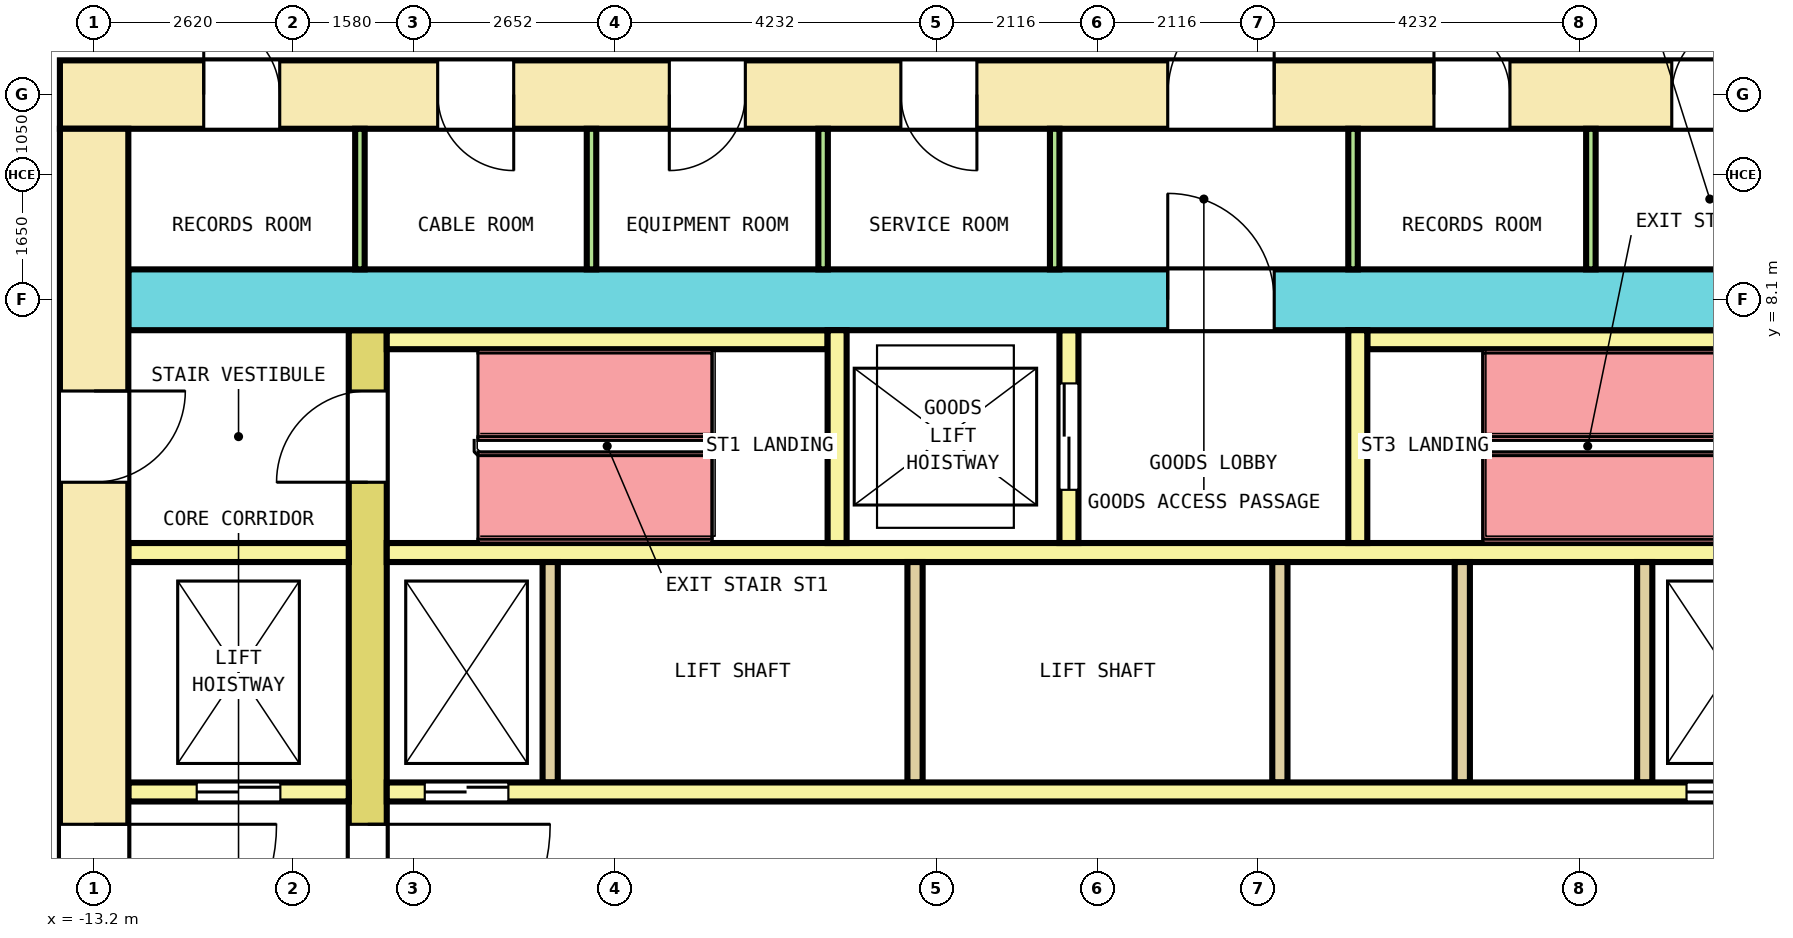
"""IFC4 building model, lengths in metres.
Left out: names, types, materials, properties, quantities, classifications, styles, units other than length and angle.
Written with IfcOpenShell. Run it as: python <this file> out.ifc"""

import sys

from ifc_helpers import new_model, si_unit, direction, frame, frame_2d, origin, place, context, subcontext, project, spatial, rectangle, extrude, element, fill, save


model = new_model("IFC4")
c1 = context("Model", 3, precision=1e-05, world=origin(), true_north=direction((0.0, 1.0)))
c2 = subcontext(c1, "Body", "Model", "MODEL_VIEW")
j1 = project(units=[si_unit("LENGTHUNIT", "METRE"), si_unit("PLANEANGLEUNIT", "RADIAN")], contexts=[c1])
p1 = place(None, origin())
s1 = spatial("IfcSite", under=j1, at=p1, CompositionType="ELEMENT")
p2 = place(p1, origin())
s2 = spatial("IfcBuilding", under=s1, at=p2, CompositionType="ELEMENT")
p3 = place(p2, frame((0.0, 0.0, 23.4)))
s3 = spatial("IfcBuildingStorey", under=s2, at=p3, CompositionType="ELEMENT", Elevation=23.4)
p4 = place(p3, frame((-13.65, 10.8, 0.0), z_axis=(0.0, 0.0, 1.0), x_axis=(1.0, 0.0, 0.0)))
e1 = element("IfcWall", 1, at=p4, inside=s3, PredefinedType="SHEAR", context=c2, shape_type="SweptSolid", body=[
    extrude(rectangle(XDim=27.3, YDim=0.9, at=frame_2d((13.65, 0.0))), origin(), (0.0, 0.0, 1.0), 4.1),
])
p5 = place(p4, frame((1.892, 0.0, 0.0)))
e2 = element("IfcOpeningElement", 2, at=p5, cuts=e1, PredefinedType="OPENING", context=c2, shape_type="SweptSolid", body=[
    extrude(rectangle(XDim=1.0, YDim=2.1, at=frame_2d((0.5, 1.05))), frame((0.0, 0.46, 0.0), z_axis=(0.0, -1.0, 0.0), x_axis=(1.0, 0.0, 0.0)), (0.0, 0.0, 1.0), 0.92),
])
p6 = place(p4, frame((4.97, 0.0, 0.0)))
e3 = element("IfcOpeningElement", 3, at=p6, cuts=e1, PredefinedType="OPENING", context=c2, shape_type="SweptSolid", body=[
    extrude(rectangle(XDim=1.0, YDim=2.1, at=frame_2d((0.5, 1.05))), frame((0.0, 0.46, 0.0), z_axis=(0.0, -1.0, 0.0), x_axis=(1.0, 0.0, 0.0)), (0.0, 0.0, 1.0), 0.92),
])
p7 = place(p4, frame((8.017, 0.0, 0.0)))
e4 = element("IfcOpeningElement", 4, at=p7, cuts=e1, PredefinedType="OPENING", context=c2, shape_type="SweptSolid", body=[
    extrude(rectangle(XDim=1.0, YDim=2.1, at=frame_2d((0.5, 1.05))), frame((0.0, 0.46, 0.0), z_axis=(0.0, -1.0, 0.0), x_axis=(1.0, 0.0, 0.0)), (0.0, 0.0, 1.0), 0.92),
])
p8 = place(p4, frame((11.064, 0.0, 0.0)))
e5 = element("IfcOpeningElement", 5, at=p8, cuts=e1, PredefinedType="OPENING", context=c2, shape_type="SweptSolid", body=[
    extrude(rectangle(XDim=1.0, YDim=2.1, at=frame_2d((0.5, 1.05))), frame((0.0, 0.46, 0.0), z_axis=(0.0, -1.0, 0.0), x_axis=(1.0, 0.0, 0.0)), (0.0, 0.0, 1.0), 0.92),
])
p9 = place(p4, frame((18.077, 0.0, 0.0)))
e6 = element("IfcOpeningElement", 6, at=p9, cuts=e1, PredefinedType="OPENING", context=c2, shape_type="SweptSolid", body=[
    extrude(rectangle(XDim=1.0, YDim=2.1, at=frame_2d((0.5, 1.05))), frame((0.0, 0.46, 0.0), z_axis=(0.0, -1.0, 0.0), x_axis=(1.0, 0.0, 0.0)), (0.0, 0.0, 1.0), 0.92),
])
p10 = place(p4, frame((21.206, 0.0, 0.0)))
e7 = element("IfcOpeningElement", 7, at=p10, cuts=e1, PredefinedType="OPENING", context=c2, shape_type="SweptSolid", body=[
    extrude(rectangle(XDim=1.0, YDim=2.1, at=frame_2d((0.5, 1.05))), frame((0.0, 0.46, 0.0), z_axis=(0.0, -1.0, 0.0), x_axis=(1.0, 0.0, 0.0)), (0.0, 0.0, 1.0), 0.92),
])
p11 = place(p4, frame((24.367, 0.0, 0.0)))
e8 = element("IfcOpeningElement", 8, at=p11, cuts=e1, PredefinedType="OPENING", context=c2, shape_type="SweptSolid", body=[
    extrude(rectangle(XDim=1.0, YDim=2.1, at=frame_2d((0.5, 1.05))), frame((0.0, 0.46, 0.0), z_axis=(0.0, -1.0, 0.0), x_axis=(1.0, 0.0, 0.0)), (0.0, 0.0, 1.0), 0.92),
])
p12 = place(p4, frame((14.575, 0.0, 0.0)))
e9 = element("IfcOpeningElement", 9, at=p12, cuts=e1, PredefinedType="OPENING", context=c2, shape_type="SweptSolid", body=[
    extrude(rectangle(XDim=1.4, YDim=2.1, at=frame_2d((0.7, 1.05))), frame((0.0, 0.46, 0.0), z_axis=(0.0, -1.0, 0.0), x_axis=(1.0, 0.0, 0.0)), (0.0, 0.0, 1.0), 0.92),
])
p13 = place(p3, frame((-13.2, -10.35, 0.0), z_axis=(0.0, 0.0, 1.0), x_axis=(0.0, 1.0, 0.0)))
e10 = element("IfcWall", 10, at=p13, inside=s3, PredefinedType="SHEAR", context=c2, shape_type="SweptSolid", body=[
    extrude(rectangle(XDim=20.7, YDim=0.9, at=frame_2d((10.35, 0.0))), origin(), (0.0, 0.0, 1.0), 4.1),
])
p14 = place(p13, frame((9.15, 0.0, 0.0)))
e11 = element("IfcOpeningElement", 11, at=p14, cuts=e10, PredefinedType="OPENING", context=c2, shape_type="SweptSolid", body=[
    extrude(rectangle(XDim=2.4, YDim=2.1, at=frame_2d((1.2, 1.05))), frame((0.0, 0.46, 0.0), z_axis=(0.0, -1.0, 0.0), x_axis=(1.0, 0.0, 0.0)), (0.0, 0.0, 1.0), 0.92),
])
p15 = place(p13, frame((16.05, 0.0, 0.0)))
e12 = element("IfcOpeningElement", 12, at=p15, cuts=e10, PredefinedType="OPENING", context=c2, shape_type="SweptSolid", body=[
    extrude(rectangle(XDim=1.2, YDim=2.1, at=frame_2d((0.6, 1.05))), frame((0.0, 0.46, 0.0), z_axis=(0.0, -1.0, 0.0), x_axis=(1.0, 0.0, 0.0)), (0.0, 0.0, 1.0), 0.92),
])
p16 = place(p13, frame((3.45, 0.0, 0.0)))
e13 = element("IfcOpeningElement", 13, at=p16, cuts=e10, PredefinedType="OPENING", context=c2, shape_type="SweptSolid", body=[
    extrude(rectangle(XDim=1.2, YDim=2.1, at=frame_2d((0.6, 1.05))), frame((0.0, 0.46, 0.0), z_axis=(0.0, -1.0, 0.0), x_axis=(1.0, 0.0, 0.0)), (0.0, 0.0, 1.0), 0.92),
])
p17 = place(p3, frame((-12.75, 8.1, 0.0), z_axis=(0.0, 0.0, 1.0), x_axis=(1.0, 0.0, 0.0)))
e14 = element("IfcWall", 14, at=p17, inside=s3, PredefinedType="SHEAR", context=c2, shape_type="SweptSolid", body=[
    extrude(rectangle(XDim=25.5, YDim=0.8, at=frame_2d((12.75, 0.0))), origin(), (0.0, 0.0, 1.0), 4.1),
])
p18 = place(p17, frame((13.675, 0.0, 0.0)))
e15 = element("IfcOpeningElement", 15, at=p18, cuts=e14, PredefinedType="OPENING", context=c2, shape_type="SweptSolid", body=[
    extrude(rectangle(XDim=1.4, YDim=2.1, at=frame_2d((0.7, 1.05))), frame((0.0, 0.41, 0.0), z_axis=(0.0, -1.0, 0.0), x_axis=(1.0, 0.0, 0.0)), (0.0, 0.0, 1.0), 0.82),
])
p19 = place(p3, frame((-9.6, -7.7, 0.0), z_axis=(0.0, 0.0, 1.0), x_axis=(0.0, 1.0, 0.0)))
e16 = element("IfcWall", 16, at=p19, inside=s3, PredefinedType="SHEAR", context=c2, shape_type="SweptSolid", body=[
    extrude(rectangle(XDim=15.4, YDim=0.5, at=frame_2d((7.7, 0.0))), origin(), (0.0, 0.0, 1.0), 4.1),
])
p20 = place(p19, frame((6.5, 0.0, 0.0)))
e17 = element("IfcOpeningElement", 17, at=p20, cuts=e16, PredefinedType="OPENING", context=c2, shape_type="SweptSolid", body=[
    extrude(rectangle(XDim=2.4, YDim=2.1, at=frame_2d((1.2, 1.05))), frame((0.0, 0.26, 0.0), z_axis=(0.0, -1.0, 0.0), x_axis=(1.0, 0.0, 0.0)), (0.0, 0.0, 1.0), 0.52),
])
p21 = place(p19, frame((13.4, 0.0, 0.0)))
e18 = element("IfcOpeningElement", 18, at=p21, cuts=e16, PredefinedType="OPENING", context=c2, shape_type="SweptSolid", body=[
    extrude(rectangle(XDim=1.2, YDim=2.1, at=frame_2d((0.6, 1.05))), frame((0.0, 0.26, 0.0), z_axis=(0.0, -1.0, 0.0), x_axis=(1.0, 0.0, 0.0)), (0.0, 0.0, 1.0), 0.52),
])
p22 = place(p19, frame((0.8, 0.0, 0.0)))
e19 = element("IfcOpeningElement", 19, at=p22, cuts=e16, PredefinedType="OPENING", context=c2, shape_type="SweptSolid", body=[
    extrude(rectangle(XDim=1.2, YDim=2.1, at=frame_2d((0.6, 1.05))), frame((0.0, 0.26, 0.0), z_axis=(0.0, -1.0, 0.0), x_axis=(1.0, 0.0, 0.0)), (0.0, 0.0, 1.0), 0.52),
])
p23 = place(p3, frame((-12.75, 1.625, 0.0), z_axis=(0.0, 0.0, 1.0), x_axis=(1.0, 0.0, 0.0)))
e20 = element("IfcWall", 20, at=p23, inside=s3, PredefinedType="SOLIDWALL", context=c2, shape_type="SweptSolid", body=[
    extrude(rectangle(XDim=2.9, YDim=0.25, at=frame_2d((1.45, 0.0))), origin(), (0.0, 0.0, 1.0), 4.1),
])
p24 = place(p23, frame((0.9, 0.0, 0.0)))
e21 = element("IfcOpeningElement", 21, at=p24, cuts=e20, PredefinedType="OPENING", context=c2, shape_type="SweptSolid", body=[
    extrude(rectangle(XDim=1.1, YDim=2.1, at=frame_2d((0.55, 1.05))), frame((0.0, 0.135, 0.0), z_axis=(0.0, -1.0, 0.0), x_axis=(1.0, 0.0, 0.0)), (0.0, 0.0, 1.0), 0.27),
])
p25 = place(p3, frame((-9.35, 1.625, 0.0), z_axis=(0.0, 0.0, 1.0), x_axis=(1.0, 0.0, 0.0)))
e22 = element("IfcWall", 22, at=p25, inside=s3, PredefinedType="SOLIDWALL", context=c2, shape_type="SweptSolid", body=[
    extrude(rectangle(XDim=18.7, YDim=0.25, at=frame_2d((9.35, 0.0))), origin(), (0.0, 0.0, 1.0), 4.1),
])
p26 = place(p25, frame((0.5, 0.0, 0.0)))
e23 = element("IfcOpeningElement", 23, at=p26, cuts=e22, PredefinedType="OPENING", context=c2, shape_type="SweptSolid", body=[
    extrude(rectangle(XDim=1.1, YDim=2.1, at=frame_2d((0.55, 1.05))), frame((0.0, 0.135, 0.0), z_axis=(0.0, -1.0, 0.0), x_axis=(1.0, 0.0, 0.0)), (0.0, 0.0, 1.0), 0.27),
])
p27 = place(p25, frame((17.1, 0.0, 0.0)))
e24 = element("IfcOpeningElement", 24, at=p27, cuts=e22, PredefinedType="OPENING", context=c2, shape_type="SweptSolid", body=[
    extrude(rectangle(XDim=1.1, YDim=2.1, at=frame_2d((0.55, 1.05))), frame((0.0, 0.135, 0.0), z_axis=(0.0, -1.0, 0.0), x_axis=(1.0, 0.0, 0.0)), (0.0, 0.0, 1.0), 0.27),
])
p28 = place(p3, frame((-12.75, 4.775, 0.0), z_axis=(0.0, 0.0, 1.0), x_axis=(1.0, 0.0, 0.0)))
e25 = element("IfcWall", 25, at=p28, inside=s3, PredefinedType="SOLIDWALL", context=c2, shape_type="SweptSolid", body=[
    extrude(rectangle(XDim=2.9, YDim=0.25, at=frame_2d((1.45, 0.0))), origin(), (0.0, 0.0, 1.0), 4.1),
])
p29 = place(p3, frame((-9.35, 4.775, 0.0), z_axis=(0.0, 0.0, 1.0), x_axis=(1.0, 0.0, 0.0)))
e26 = element("IfcWall", 26, at=p29, inside=s3, PredefinedType="SOLIDWALL", context=c2, shape_type="SweptSolid", body=[
    extrude(rectangle(XDim=18.7, YDim=0.25, at=frame_2d((9.35, 0.0))), origin(), (0.0, 0.0, 1.0), 4.1),
])
for number, where, z_axis, x_axis in (
    (27, (-7.2, 1.75, 0.0), (0.0, 0.0, 1.0), (0.0, 1.0, 0.0)),
    (28, (-2.4, 1.75, 0.0), (0.0, 0.0, 1.0), (0.0, 1.0, 0.0)),
    (29, (2.4, 1.75, 0.0), (0.0, 0.0, 1.0), (0.0, 1.0, 0.0)),
    (30, (4.8, 1.75, 0.0), (0.0, 0.0, 1.0), (0.0, 1.0, 0.0)),
    (31, (7.2, 1.75, 0.0), (0.0, 0.0, 1.0), (0.0, 1.0, 0.0)),
):
    element("IfcWall", number, at=place(p3, frame(where, z_axis=z_axis, x_axis=x_axis)), inside=s3, PredefinedType="SOLIDWALL", context=c2, shape_type="SweptSolid", body=[
        extrude(rectangle(XDim=2.9, YDim=0.2, at=frame_2d((1.45, 0.0))), origin(), (0.0, 0.0, 1.0), 4.1),
    ])
for number, where, z_axis, x_axis in (
    (32, (-9.35, 7.575, 0.0), (0.0, 0.0, 1.0), (1.0, 0.0, 0.0)),
    (33, (3.55, 7.575, 0.0), (0.0, 0.0, 1.0), (1.0, 0.0, 0.0)),
):
    element("IfcWall", number, at=place(p3, frame(where, z_axis=z_axis, x_axis=x_axis)), inside=s3, PredefinedType="SOLIDWALL", context=c2, shape_type="SweptSolid", body=[
        extrude(rectangle(XDim=5.8, YDim=0.25, at=frame_2d((2.9, 0.0))), origin(), (0.0, 0.0, 1.0), 4.1),
    ])
p30 = place(p3, frame((-3.425, 4.9, 0.0), z_axis=(0.0, 0.0, 1.0), x_axis=(0.0, 1.0, 0.0)))
e34 = element("IfcWall", 34, at=p30, inside=s3, PredefinedType="SOLIDWALL", context=c2, shape_type="SweptSolid", body=[
    extrude(rectangle(XDim=2.8, YDim=0.25, at=frame_2d((1.4, 0.0))), origin(), (0.0, 0.0, 1.0), 4.1),
])
p31 = place(p3, frame((-0.375, 4.9, 0.0), z_axis=(0.0, 0.0, 1.0), x_axis=(0.0, 1.0, 0.0)))
e35 = element("IfcWall", 35, at=p31, inside=s3, PredefinedType="SOLIDWALL", context=c2, shape_type="SweptSolid", body=[
    extrude(rectangle(XDim=2.8, YDim=0.25, at=frame_2d((1.4, 0.0))), origin(), (0.0, 0.0, 1.0), 4.1),
])
p32 = place(p31, frame((0.7, 0.0, 0.0)))
e36 = element("IfcOpeningElement", 36, at=p32, cuts=e35, PredefinedType="OPENING", context=c2, shape_type="SweptSolid", body=[
    extrude(rectangle(XDim=1.4, YDim=2.1, at=frame_2d((0.7, 1.05))), frame((0.0, 0.135, 0.0), z_axis=(0.0, -1.0, 0.0), x_axis=(1.0, 0.0, 0.0)), (0.0, 0.0, 1.0), 0.27),
])
p33 = place(p3, frame((3.425, 4.9, 0.0), z_axis=(0.0, 0.0, 1.0), x_axis=(0.0, 1.0, 0.0)))
e37 = element("IfcWall", 37, at=p33, inside=s3, PredefinedType="SOLIDWALL", context=c2, shape_type="SweptSolid", body=[
    extrude(rectangle(XDim=2.8, YDim=0.25, at=frame_2d((1.4, 0.0))), origin(), (0.0, 0.0, 1.0), 4.1),
])
for number, where, z_axis, x_axis in (
    (38, (-9.703, 8.5, 0.0), (0.0, 0.0, 1.0), (0.0, 1.0, 0.0)),
    (39, (-6.656, 8.5, 0.0), (0.0, 0.0, 1.0), (0.0, 1.0, 0.0)),
    (40, (-3.609, 8.5, 0.0), (0.0, 0.0, 1.0), (0.0, 1.0, 0.0)),
    (41, (-0.562, 8.5, 0.0), (0.0, 0.0, 1.0), (0.0, 1.0, 0.0)),
    (42, (3.363, 8.5, 0.0), (0.0, 0.0, 1.0), (0.0, 1.0, 0.0)),
    (43, (6.492, 8.5, 0.0), (0.0, 0.0, 1.0), (0.0, 1.0, 0.0)),
):
    element("IfcWall", number, at=place(p3, frame(where, z_axis=z_axis, x_axis=x_axis)), inside=s3, PredefinedType="PARTITIONING", context=c2, shape_type="SweptSolid", body=[
        extrude(rectangle(XDim=1.85, YDim=0.125, at=frame_2d((0.925, 0.0))), origin(), (0.0, 0.0, 1.0), 4.1),
    ])
p34 = place(p24, origin())
e44 = element("IfcDoor", 44, at=p34, inside=s3, OperationType="DOUBLE_DOOR_SLIDING", PredefinedType="DOOR", context=c2, shape_type="SweptSolid", body=[
    extrude(rectangle(XDim=1.1, YDim=2.1, at=frame_2d((0.55, 1.05))), frame((0.0, 0.075, 0.0), z_axis=(0.0, -1.0, 0.0), x_axis=(1.0, 0.0, 0.0)), (0.0, 0.0, 1.0), 0.15),
])
fill(e21, e44)
p35 = place(p26, origin())
e45 = element("IfcDoor", 45, at=p35, inside=s3, OperationType="DOUBLE_DOOR_SLIDING", PredefinedType="DOOR", context=c2, shape_type="SweptSolid", body=[
    extrude(rectangle(XDim=1.1, YDim=2.1, at=frame_2d((0.55, 1.05))), frame((0.0, 0.075, 0.0), z_axis=(0.0, -1.0, 0.0), x_axis=(1.0, 0.0, 0.0)), (0.0, 0.0, 1.0), 0.15),
])
fill(e23, e45)
p36 = place(p27, origin())
e46 = element("IfcDoor", 46, at=p36, inside=s3, OperationType="DOUBLE_DOOR_SLIDING", PredefinedType="DOOR", context=c2, shape_type="SweptSolid", body=[
    extrude(rectangle(XDim=1.1, YDim=2.1, at=frame_2d((0.55, 1.05))), frame((0.0, 0.075, 0.0), z_axis=(0.0, -1.0, 0.0), x_axis=(1.0, 0.0, 0.0)), (0.0, 0.0, 1.0), 0.15),
])
fill(e24, e46)
p37 = place(p32, origin())
e47 = element("IfcDoor", 47, at=p37, inside=s3, OperationType="DOUBLE_DOOR_SLIDING", PredefinedType="DOOR", context=c2, shape_type="SweptSolid", body=[
    extrude(rectangle(XDim=1.4, YDim=2.1, at=frame_2d((0.7, 1.05))), frame((0.0, 0.075, 0.0), z_axis=(0.0, -1.0, 0.0), x_axis=(1.0, 0.0, 0.0)), (0.0, 0.0, 1.0), 0.15),
])
fill(e36, e47)
p38 = place(p20, origin())
e48 = element("IfcDoor", 48, at=p38, inside=s3, OperationType="DOUBLE_DOOR_SINGLE_SWING", PredefinedType="DOOR", context=c2, shape_type="SweptSolid", body=[
    extrude(rectangle(XDim=2.4, YDim=2.1, at=frame_2d((1.2, 1.05))), frame((0.0, 0.2, 0.0), z_axis=(0.0, -1.0, 0.0), x_axis=(1.0, 0.0, 0.0)), (0.0, 0.0, 1.0), 0.4),
])
fill(e17, e48)
p39 = place(p14, origin())
e49 = element("IfcDoor", 49, at=p39, inside=s3, OperationType="DOUBLE_DOOR_SINGLE_SWING", PredefinedType="DOOR", context=c2, shape_type="SweptSolid", body=[
    extrude(rectangle(XDim=2.4, YDim=2.1, at=frame_2d((1.2, 1.05))), frame((0.0, 0.3, 0.0), z_axis=(0.0, -1.0, 0.0), x_axis=(1.0, 0.0, 0.0)), (0.0, 0.0, 1.0), 0.6),
])
fill(e11, e49)
p40 = place(p21, origin())
e50 = element("IfcDoor", 50, at=p40, inside=s3, OperationType="SINGLE_SWING_LEFT", PredefinedType="DOOR", context=c2, shape_type="SweptSolid", body=[
    extrude(rectangle(XDim=1.2, YDim=2.1, at=frame_2d((0.6, 1.05))), frame((0.0, 0.2, 0.0), z_axis=(0.0, -1.0, 0.0), x_axis=(1.0, 0.0, 0.0)), (0.0, 0.0, 1.0), 0.4),
])
fill(e18, e50)
p41 = place(p15, origin())
e51 = element("IfcDoor", 51, at=p41, inside=s3, OperationType="SINGLE_SWING_RIGHT", PredefinedType="DOOR", context=c2, shape_type="SweptSolid", body=[
    extrude(rectangle(XDim=1.2, YDim=2.1, at=frame_2d((0.6, 1.05))), frame((0.0, 0.3, 0.0), z_axis=(0.0, -1.0, 0.0), x_axis=(1.0, 0.0, 0.0)), (0.0, 0.0, 1.0), 0.6),
])
fill(e12, e51)
p42 = place(p18, origin())
e52 = element("IfcDoor", 52, at=p42, inside=s3, OperationType="DOUBLE_DOOR_SINGLE_SWING", PredefinedType="DOOR", context=c2, shape_type="SweptSolid", body=[
    extrude(rectangle(XDim=1.4, YDim=2.1, at=frame_2d((0.7, 1.05))), frame((0.0, 0.3, 0.0), z_axis=(0.0, -1.0, 0.0), x_axis=(1.0, 0.0, 0.0)), (0.0, 0.0, 1.0), 0.6),
])
fill(e15, e52)
p43 = place(p5, origin())
e53 = element("IfcDoor", 53, at=p43, inside=s3, OperationType="SINGLE_SWING_LEFT", PredefinedType="DOOR", context=c2, shape_type="SweptSolid", body=[
    extrude(rectangle(XDim=1.0, YDim=2.1, at=frame_2d((0.5, 1.05))), frame((0.0, 0.3, 0.0), z_axis=(0.0, -1.0, 0.0), x_axis=(1.0, 0.0, 0.0)), (0.0, 0.0, 1.0), 0.6),
])
fill(e2, e53)
p44 = place(p6, origin())
e54 = element("IfcDoor", 54, at=p44, inside=s3, OperationType="SINGLE_SWING_RIGHT", PredefinedType="DOOR", context=c2, shape_type="SweptSolid", body=[
    extrude(rectangle(XDim=1.0, YDim=2.1, at=frame_2d((0.5, 1.05))), frame((0.0, 0.3, 0.0), z_axis=(0.0, -1.0, 0.0), x_axis=(1.0, 0.0, 0.0)), (0.0, 0.0, 1.0), 0.6),
])
fill(e3, e54)
p45 = place(p7, origin())
e55 = element("IfcDoor", 55, at=p45, inside=s3, OperationType="SINGLE_SWING_LEFT", PredefinedType="DOOR", context=c2, shape_type="SweptSolid", body=[
    extrude(rectangle(XDim=1.0, YDim=2.1, at=frame_2d((0.5, 1.05))), frame((0.0, 0.3, 0.0), z_axis=(0.0, -1.0, 0.0), x_axis=(1.0, 0.0, 0.0)), (0.0, 0.0, 1.0), 0.6),
])
fill(e4, e55)
p46 = place(p8, origin())
e56 = element("IfcDoor", 56, at=p46, inside=s3, OperationType="SINGLE_SWING_RIGHT", PredefinedType="DOOR", context=c2, shape_type="SweptSolid", body=[
    extrude(rectangle(XDim=1.0, YDim=2.1, at=frame_2d((0.5, 1.05))), frame((0.0, 0.3, 0.0), z_axis=(0.0, -1.0, 0.0), x_axis=(1.0, 0.0, 0.0)), (0.0, 0.0, 1.0), 0.6),
])
fill(e5, e56)
p47 = place(p9, origin())
e57 = element("IfcDoor", 57, at=p47, inside=s3, OperationType="SINGLE_SWING_LEFT", PredefinedType="DOOR", context=c2, shape_type="SweptSolid", body=[
    extrude(rectangle(XDim=1.0, YDim=2.1, at=frame_2d((0.5, 1.05))), frame((0.0, 0.3, 0.0), z_axis=(0.0, -1.0, 0.0), x_axis=(1.0, 0.0, 0.0)), (0.0, 0.0, 1.0), 0.6),
])
fill(e6, e57)
p48 = place(p10, origin())
e58 = element("IfcDoor", 58, at=p48, inside=s3, OperationType="SINGLE_SWING_RIGHT", PredefinedType="DOOR", context=c2, shape_type="SweptSolid", body=[
    extrude(rectangle(XDim=1.0, YDim=2.1, at=frame_2d((0.5, 1.05))), frame((0.0, 0.3, 0.0), z_axis=(0.0, -1.0, 0.0), x_axis=(1.0, 0.0, 0.0)), (0.0, 0.0, 1.0), 0.6),
])
fill(e7, e58)
p49 = place(p12, origin())
e59 = element("IfcDoor", 59, at=p49, inside=s3, OperationType="DOUBLE_DOOR_SINGLE_SWING", PredefinedType="DOOR", context=c2, shape_type="SweptSolid", body=[
    extrude(rectangle(XDim=1.4, YDim=2.1, at=frame_2d((0.7, 1.05))), frame((0.0, 0.3, 0.0), z_axis=(0.0, -1.0, 0.0), x_axis=(1.0, 0.0, 0.0)), (0.0, 0.0, 1.0), 0.6),
])
fill(e9, e59)
save(model, sys.argv[1])
